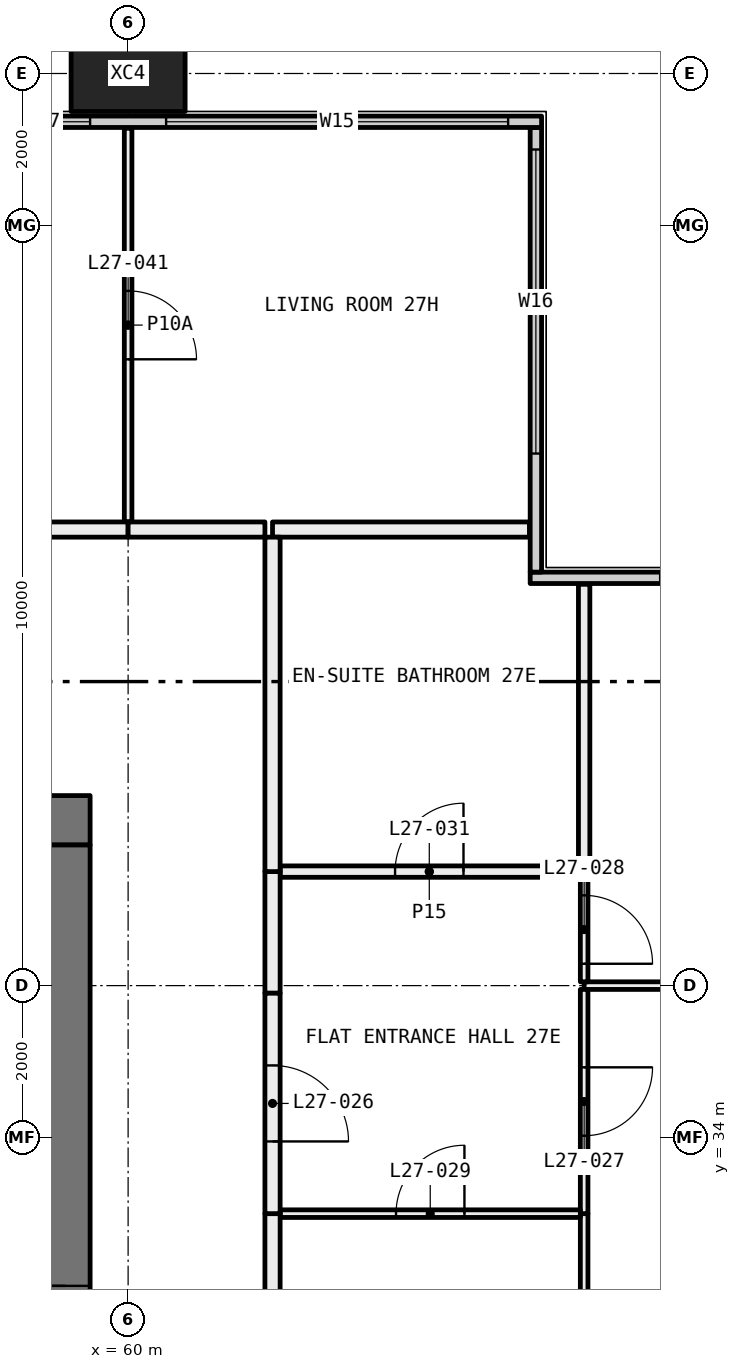
"""IFC4 building model, lengths in metres.
Left out: names, types, materials, properties, quantities, classifications, styles, units other than length and angle.
Written with IfcOpenShell. Run it as: python <this file> out.ifc"""

import sys

from ifc_helpers import new_model, si_unit, direction, frame, frame_2d, origin, origin_2d, place, context, subcontext, project, spatial, rectangle, hollow_rectangle, extrude, element, fill, save


model = new_model("IFC4")
c1 = context("Model", 3, precision=1e-05, world=origin(), true_north=direction((0.0, 1.0)))
c2 = subcontext(c1, "Body", "Model", "MODEL_VIEW")
j1 = project(units=[si_unit("LENGTHUNIT", "METRE"), si_unit("PLANEANGLEUNIT", "RADIAN")], contexts=[c1])
p1 = place(None, origin())
s1 = spatial("IfcSite", under=j1, at=p1, CompositionType="ELEMENT")
p2 = place(p1, origin())
s2 = spatial("IfcBuilding", under=s1, at=p2, CompositionType="ELEMENT")
p3 = place(p2, frame((0.0, 0.0, 106.95)))
s3 = spatial("IfcBuildingStorey", under=s2, at=p3, CompositionType="ELEMENT", Elevation=106.95)
p4 = place(p3, frame((60.0, 48.0, -0.4), z_axis=(0.0, 0.0, 1.0), x_axis=(1.0, 0.0, 0.0)))
e1 = element("IfcColumn", 1, at=p4, inside=s3, PredefinedType="COLUMN", context=c2, shape_type="SweptSolid", body=[
    extrude(hollow_rectangle(XDim=1.5, YDim=1.0, WallThickness=0.06, at=origin_2d()), origin(), (0.0, 0.0, 1.0), 3.45),
])
p5 = place(p3, frame((65.29, 41.365, 0.0), z_axis=(0.0, 0.0, 1.0), x_axis=(1.0, 0.0, 0.0)))
e2 = element("IfcWall", 2, at=p5, inside=s3, PredefinedType="ELEMENTEDWALL", context=c2, shape_type="SweptSolid", body=[
    extrude(rectangle(XDim=6.15, YDim=0.15, at=frame_2d((3.075, 0.0))), origin(), (0.0, 0.0, 1.0), 3.05),
])
p6 = place(p5, frame((1.71, 0.0, 0.45)))
e3 = element("IfcOpeningElement", 3, at=p6, cuts=e2, PredefinedType="OPENING", context=c2, shape_type="SweptSolid", body=[
    extrude(rectangle(XDim=4.0, YDim=2.55, at=frame_2d((2.0, 1.275))), frame((0.0, 0.085, 0.0), z_axis=(0.0, -1.0, 0.0), x_axis=(1.0, 0.0, 0.0)), (0.0, 0.0, 1.0), 0.17),
])
p7 = place(p3, frame((65.365, 41.44, 0.0), z_axis=(0.0, 0.0, 1.0), x_axis=(0.0, 1.0, 0.0)))
e4 = element("IfcWall", 4, at=p7, inside=s3, PredefinedType="ELEMENTEDWALL", context=c2, shape_type="SweptSolid", body=[
    extrude(rectangle(XDim=5.85, YDim=0.15, at=frame_2d((2.925, 0.0))), origin(), (0.0, 0.0, 1.0), 3.05),
])
p8 = place(p7, frame((1.56, 0.0, 0.45)))
e5 = element("IfcOpeningElement", 5, at=p8, cuts=e4, PredefinedType="OPENING", context=c2, shape_type="SweptSolid", body=[
    extrude(rectangle(XDim=4.0, YDim=2.55, at=frame_2d((2.0, 1.275))), frame((0.0, 0.085, 0.0), z_axis=(0.0, -1.0, 0.0), x_axis=(1.0, 0.0, 0.0)), (0.0, 0.0, 1.0), 0.17),
])
p9 = place(p3, frame((6.56, 47.365, 0.0), z_axis=(0.0, 0.0, 1.0), x_axis=(1.0, 0.0, 0.0)))
e6 = element("IfcWall", 6, at=p9, inside=s3, PredefinedType="ELEMENTEDWALL", context=c2, shape_type="SweptSolid", body=[
    extrude(rectangle(XDim=58.88, YDim=0.15, at=frame_2d((29.44, 0.0))), origin(), (0.0, 0.0, 1.0), 3.05),
])
p10 = place(p9, frame((0.44, 0.0, 0.45)))
e7 = element("IfcOpeningElement", 7, at=p10, cuts=e6, PredefinedType="OPENING", context=c2, shape_type="SweptSolid", body=[
    extrude(rectangle(XDim=4.5, YDim=2.55, at=frame_2d((2.25, 1.275))), frame((0.0, 0.085, 0.0), z_axis=(0.0, -1.0, 0.0), x_axis=(1.0, 0.0, 0.0)), (0.0, 0.0, 1.0), 0.17),
])
p11 = place(p9, frame((5.94, 0.0, 0.45)))
e8 = element("IfcOpeningElement", 8, at=p11, cuts=e6, PredefinedType="OPENING", context=c2, shape_type="SweptSolid", body=[
    extrude(rectangle(XDim=1.25, YDim=2.55, at=frame_2d((0.625, 1.275))), frame((0.0, 0.085, 0.0), z_axis=(0.0, -1.0, 0.0), x_axis=(1.0, 0.0, 0.0)), (0.0, 0.0, 1.0), 0.17),
])
p12 = place(p9, frame((15.69, 0.0, 0.45)))
e9 = element("IfcOpeningElement", 9, at=p12, cuts=e6, PredefinedType="OPENING", context=c2, shape_type="SweptSolid", body=[
    extrude(rectangle(XDim=1.25, YDim=2.55, at=frame_2d((0.625, 1.275))), frame((0.0, 0.085, 0.0), z_axis=(0.0, -1.0, 0.0), x_axis=(1.0, 0.0, 0.0)), (0.0, 0.0, 1.0), 0.17),
])
p13 = place(p9, frame((17.94, 0.0, 0.45)))
e10 = element("IfcOpeningElement", 10, at=p13, cuts=e6, PredefinedType="OPENING", context=c2, shape_type="SweptSolid", body=[
    extrude(rectangle(XDim=1.25, YDim=2.55, at=frame_2d((0.625, 1.275))), frame((0.0, 0.085, 0.0), z_axis=(0.0, -1.0, 0.0), x_axis=(1.0, 0.0, 0.0)), (0.0, 0.0, 1.0), 0.17),
])
p14 = place(p9, frame((27.69, 0.0, 0.45)))
e11 = element("IfcOpeningElement", 11, at=p14, cuts=e6, PredefinedType="OPENING", context=c2, shape_type="SweptSolid", body=[
    extrude(rectangle(XDim=1.25, YDim=2.55, at=frame_2d((0.625, 1.275))), frame((0.0, 0.085, 0.0), z_axis=(0.0, -1.0, 0.0), x_axis=(1.0, 0.0, 0.0)), (0.0, 0.0, 1.0), 0.17),
])
p15 = place(p9, frame((29.94, 0.0, 0.45)))
e12 = element("IfcOpeningElement", 12, at=p15, cuts=e6, PredefinedType="OPENING", context=c2, shape_type="SweptSolid", body=[
    extrude(rectangle(XDim=1.25, YDim=2.55, at=frame_2d((0.625, 1.275))), frame((0.0, 0.085, 0.0), z_axis=(0.0, -1.0, 0.0), x_axis=(1.0, 0.0, 0.0)), (0.0, 0.0, 1.0), 0.17),
])
p16 = place(p9, frame((39.69, 0.0, 0.45)))
e13 = element("IfcOpeningElement", 13, at=p16, cuts=e6, PredefinedType="OPENING", context=c2, shape_type="SweptSolid", body=[
    extrude(rectangle(XDim=1.25, YDim=2.55, at=frame_2d((0.625, 1.275))), frame((0.0, 0.085, 0.0), z_axis=(0.0, -1.0, 0.0), x_axis=(1.0, 0.0, 0.0)), (0.0, 0.0, 1.0), 0.17),
])
p17 = place(p9, frame((41.94, 0.0, 0.45)))
e14 = element("IfcOpeningElement", 14, at=p17, cuts=e6, PredefinedType="OPENING", context=c2, shape_type="SweptSolid", body=[
    extrude(rectangle(XDim=1.25, YDim=2.55, at=frame_2d((0.625, 1.275))), frame((0.0, 0.085, 0.0), z_axis=(0.0, -1.0, 0.0), x_axis=(1.0, 0.0, 0.0)), (0.0, 0.0, 1.0), 0.17),
])
p18 = place(p9, frame((51.69, 0.0, 0.45)))
e15 = element("IfcOpeningElement", 15, at=p18, cuts=e6, PredefinedType="OPENING", context=c2, shape_type="SweptSolid", body=[
    extrude(rectangle(XDim=1.25, YDim=2.55, at=frame_2d((0.625, 1.275))), frame((0.0, 0.085, 0.0), z_axis=(0.0, -1.0, 0.0), x_axis=(1.0, 0.0, 0.0)), (0.0, 0.0, 1.0), 0.17),
])
p19 = place(p9, frame((53.94, 0.0, 0.45)))
e16 = element("IfcOpeningElement", 16, at=p19, cuts=e6, PredefinedType="OPENING", context=c2, shape_type="SweptSolid", body=[
    extrude(rectangle(XDim=4.5, YDim=2.55, at=frame_2d((2.25, 1.275))), frame((0.0, 0.085, 0.0), z_axis=(0.0, -1.0, 0.0), x_axis=(1.0, 0.0, 0.0)), (0.0, 0.0, 1.0), 0.17),
])
p20 = place(p3, frame((71.28, 36.0, 0.0), z_axis=(0.0, 0.0, 1.0), x_axis=(-1.0, 0.0, 0.0)))
e17 = element("IfcWall", 17, at=p20, inside=s3, PredefinedType="PARTITIONING", context=c2, shape_type="SweptSolid", body=[
    extrude(rectangle(XDim=5.28, YDim=0.1, at=frame_2d((2.64, 0.0))), origin(), (0.0, 0.0, 1.0), 2.45),
])
p21 = place(p3, frame((66.0, 33.0, 0.0), z_axis=(0.0, 0.0, 1.0), x_axis=(0.0, -1.0, 0.0)))
e18 = element("IfcWall", 18, at=p21, inside=s3, PredefinedType="PARTITIONING", context=c2, shape_type="SweptSolid", body=[
    extrude(rectangle(XDim=2.95, YDim=0.1, at=frame_2d((1.475, 0.0))), origin(), (0.0, 0.0, 1.0), 3.05),
])
p22 = place(p3, frame((66.0, 35.95, 0.0), z_axis=(0.0, 0.0, 1.0), x_axis=(0.0, -1.0, 0.0)))
e19 = element("IfcWall", 19, at=p22, inside=s3, PredefinedType="PARTITIONING", context=c2, shape_type="SweptSolid", body=[
    extrude(rectangle(XDim=2.95, YDim=0.1, at=frame_2d((1.475, 0.0))), origin(), (0.0, 0.0, 1.0), 2.45),
])
p23 = place(p22, frame((1.025, 0.0, 0.0)))
e20 = element("IfcOpeningElement", 20, at=p23, cuts=e19, PredefinedType="OPENING", context=c2, shape_type="SweptSolid", body=[
    extrude(rectangle(XDim=0.9, YDim=2.1, at=frame_2d((0.45, 1.05))), frame((0.0, 0.06, 0.0), z_axis=(0.0, -1.0, 0.0), x_axis=(1.0, 0.0, 0.0)), (0.0, 0.0, 1.0), 0.12),
])
p24 = place(p3, frame((66.0, 37.425, 0.0), z_axis=(0.0, 0.0, 1.0), x_axis=(0.0, -1.0, 0.0)))
e21 = element("IfcWall", 21, at=p24, inside=s3, PredefinedType="PARTITIONING", context=c2, shape_type="SweptSolid", body=[
    extrude(rectangle(XDim=1.375, YDim=0.1, at=frame_2d((0.688, 0.0))), origin(), (0.0, 0.0, 1.0), 2.45),
])
p25 = place(p24, frame((0.238, 0.0, 0.0)))
e22 = element("IfcOpeningElement", 22, at=p25, cuts=e21, PredefinedType="OPENING", context=c2, shape_type="SweptSolid", body=[
    extrude(rectangle(XDim=0.9, YDim=2.1, at=frame_2d((0.45, 1.05))), frame((0.0, 0.06, 0.0), z_axis=(0.0, -1.0, 0.0), x_axis=(1.0, 0.0, 0.0)), (0.0, 0.0, 1.0), 0.12),
])
p26 = place(p3, frame((66.0, 41.28, 0.0), z_axis=(0.0, 0.0, 1.0), x_axis=(0.0, -1.0, 0.0)))
e23 = element("IfcWall", 23, at=p26, inside=s3, PredefinedType="PARTITIONING", context=c2, shape_type="SweptSolid", body=[
    extrude(rectangle(XDim=3.78, YDim=0.15, at=frame_2d((1.89, 0.0))), origin(), (0.0, 0.0, 1.0), 3.05),
])
p27 = place(p3, frame((65.95, 33.0, 0.0), z_axis=(0.0, 0.0, 1.0), x_axis=(-1.0, 0.0, 0.0)))
e24 = element("IfcWall", 24, at=p27, inside=s3, PredefinedType="PARTITIONING", context=c2, shape_type="SweptSolid", body=[
    extrude(rectangle(XDim=3.95, YDim=0.1, at=frame_2d((1.975, 0.0))), origin(), (0.0, 0.0, 1.0), 3.05),
])
p28 = place(p27, frame((1.525, 0.0, 0.0)))
e25 = element("IfcOpeningElement", 25, at=p28, cuts=e24, PredefinedType="OPENING", context=c2, shape_type="SweptSolid", body=[
    extrude(rectangle(XDim=0.9, YDim=2.1, at=frame_2d((0.45, 1.05))), frame((0.0, 0.06, 0.0), z_axis=(0.0, -1.0, 0.0), x_axis=(1.0, 0.0, 0.0)), (0.0, 0.0, 1.0), 0.12),
])
p29 = place(p3, frame((61.9, 33.0, 0.0), z_axis=(0.0, 0.0, 1.0), x_axis=(0.0, -1.0, 0.0)))
e26 = element("IfcWall", 26, at=p29, inside=s3, PredefinedType="PARTITIONING", context=c2, shape_type="SweptSolid", body=[
    extrude(rectangle(XDim=9.1, YDim=0.2, at=frame_2d((4.55, 0.0))), origin(), (0.0, 0.0, 1.0), 2.45),
])
p30 = place(p3, frame((65.925, 37.5, 0.0), z_axis=(0.0, 0.0, 1.0), x_axis=(-1.0, 0.0, 0.0)))
e27 = element("IfcWall", 27, at=p30, inside=s3, PredefinedType="PARTITIONING", context=c2, shape_type="SweptSolid", body=[
    extrude(rectangle(XDim=3.925, YDim=0.15, at=frame_2d((1.962, 0.0))), origin(), (0.0, 0.0, 1.0), 3.05),
])
p31 = place(p30, frame((1.512, 0.0, 0.0)))
e28 = element("IfcOpeningElement", 28, at=p31, cuts=e27, PredefinedType="OPENING", context=c2, shape_type="SweptSolid", body=[
    extrude(rectangle(XDim=0.9, YDim=2.1, at=frame_2d((0.45, 1.05))), frame((0.0, 0.085, 0.0), z_axis=(0.0, -1.0, 0.0), x_axis=(1.0, 0.0, 0.0)), (0.0, 0.0, 1.0), 0.17),
])
p32 = place(p3, frame((61.9, 37.5, 0.0), z_axis=(0.0, 0.0, 1.0), x_axis=(0.0, -1.0, 0.0)))
e29 = element("IfcWall", 29, at=p32, inside=s3, PredefinedType="PARTITIONING", context=c2, shape_type="SweptSolid", body=[
    extrude(rectangle(XDim=1.6, YDim=0.2, at=frame_2d((0.8, 0.0))), origin(), (0.0, 0.0, 1.0), 2.45),
])
p33 = place(p3, frame((61.9, 35.9, 0.0), z_axis=(0.0, 0.0, 1.0), x_axis=(0.0, -1.0, 0.0)))
e30 = element("IfcWall", 30, at=p33, inside=s3, PredefinedType="PARTITIONING", context=c2, shape_type="SweptSolid", body=[
    extrude(rectangle(XDim=2.9, YDim=0.2, at=frame_2d((1.45, 0.0))), origin(), (0.0, 0.0, 1.0), 3.05),
])
p34 = place(p33, frame((0.95, 0.0, 0.0)))
e31 = element("IfcOpeningElement", 31, at=p34, cuts=e30, PredefinedType="OPENING", context=c2, shape_type="SweptSolid", body=[
    extrude(rectangle(XDim=1.0, YDim=2.1, at=frame_2d((0.5, 1.05))), frame((0.0, 0.11, 0.0), z_axis=(0.0, -1.0, 0.0), x_axis=(1.0, 0.0, 0.0)), (0.0, 0.0, 1.0), 0.22),
])
p35 = place(p3, frame((65.28, 42.0, 0.0), z_axis=(0.0, 0.0, 1.0), x_axis=(-1.0, 0.0, 0.0)))
e32 = element("IfcWall", 32, at=p35, inside=s3, PredefinedType="PARTITIONING", context=c2, shape_type="SweptSolid", body=[
    extrude(rectangle(XDim=3.38, YDim=0.2, at=frame_2d((1.69, 0.0))), origin(), (0.0, 0.0, 1.0), 3.05),
])
p36 = place(p3, frame((61.9, 41.9, 0.0), z_axis=(0.0, 0.0, 1.0), x_axis=(0.0, -1.0, 0.0)))
e33 = element("IfcWall", 33, at=p36, inside=s3, PredefinedType="PARTITIONING", context=c2, shape_type="SweptSolid", body=[
    extrude(rectangle(XDim=4.4, YDim=0.2, at=frame_2d((2.2, 0.0))), origin(), (0.0, 0.0, 1.0), 3.05),
])
p37 = place(p3, frame((60.0, 42.1, 0.0), z_axis=(0.0, 0.0, 1.0), x_axis=(0.0, 1.0, 0.0)))
e34 = element("IfcWall", 34, at=p37, inside=s3, PredefinedType="PARTITIONING", context=c2, shape_type="SweptSolid", body=[
    extrude(rectangle(XDim=5.18, YDim=0.1, at=frame_2d((2.59, 0.0))), origin(), (0.0, 0.0, 1.0), 3.05),
])
p38 = place(p37, frame((2.14, 0.0, 0.0)))
e35 = element("IfcOpeningElement", 35, at=p38, cuts=e34, PredefinedType="OPENING", context=c2, shape_type="SweptSolid", body=[
    extrude(rectangle(XDim=0.9, YDim=2.1, at=frame_2d((0.45, 1.05))), frame((0.0, 0.06, 0.0), z_axis=(0.0, -1.0, 0.0), x_axis=(1.0, 0.0, 0.0)), (0.0, 0.0, 1.0), 0.12),
])
p39 = place(p3, frame((54.0, 42.0, 0.0), z_axis=(0.0, 0.0, 1.0), x_axis=(1.0, 0.0, 0.0)))
e36 = element("IfcWall", 36, at=p39, inside=s3, PredefinedType="PARTITIONING", context=c2, shape_type="SweptSolid", body=[
    extrude(rectangle(XDim=6.0, YDim=0.2, at=frame_2d((3.0, 0.0))), origin(), (0.0, 0.0, 1.0), 3.05),
])
p40 = place(p39, frame((2.5, 0.0, 0.0)))
e37 = element("IfcOpeningElement", 37, at=p40, cuts=e36, PredefinedType="OPENING", context=c2, shape_type="SweptSolid", body=[
    extrude(rectangle(XDim=1.0, YDim=2.1, at=frame_2d((0.5, 1.05))), frame((0.0, 0.11, 0.0), z_axis=(0.0, -1.0, 0.0), x_axis=(1.0, 0.0, 0.0)), (0.0, 0.0, 1.0), 0.22),
])
p41 = place(p3, frame((60.0, 42.0, 0.0), z_axis=(0.0, 0.0, 1.0), x_axis=(1.0, 0.0, 0.0)))
e38 = element("IfcWall", 38, at=p41, inside=s3, PredefinedType="PARTITIONING", context=c2, shape_type="SweptSolid", body=[
    extrude(rectangle(XDim=1.8, YDim=0.2, at=frame_2d((0.9, 0.0))), origin(), (0.0, 0.0, 1.0), 3.05),
])
p42 = place(p3, frame((59.5, 38.175, 0.0), z_axis=(0.0, 0.0, 1.0), x_axis=(-1.0, 0.0, 0.0)))
e39 = element("IfcWall", 39, at=p42, inside=s3, PredefinedType="SHEAR", context=c2, shape_type="SweptSolid", body=[
    extrude(rectangle(XDim=11.0, YDim=0.65, at=frame_2d((5.5, 0.0))), origin(), (0.0, 0.0, 1.0), 3.05),
])
p43 = place(p42, frame((8.475, 0.0, 0.0)))
e40 = element("IfcOpeningElement", 40, at=p43, cuts=e39, PredefinedType="OPENING", context=c2, shape_type="SweptSolid", body=[
    extrude(rectangle(XDim=1.6, YDim=2.1, at=frame_2d((0.8, 1.05))), frame((0.0, 0.335, 0.0), z_axis=(0.0, -1.0, 0.0), x_axis=(1.0, 0.0, 0.0)), (0.0, 0.0, 1.0), 0.67),
])
p44 = place(p3, frame((59.175, 22.15, 0.0), z_axis=(0.0, 0.0, 1.0), x_axis=(0.0, 1.0, 0.0)))
e41 = element("IfcWall", 41, at=p44, inside=s3, PredefinedType="SHEAR", context=c2, shape_type="SweptSolid", body=[
    extrude(rectangle(XDim=15.7, YDim=0.65, at=frame_2d((7.85, 0.0))), origin(), (0.0, 0.0, 1.0), 3.05),
])
p45 = place(p44, frame((8.3, 0.0, 0.0)))
e42 = element("IfcOpeningElement", 42, at=p45, cuts=e41, PredefinedType="OPENING", context=c2, shape_type="SweptSolid", body=[
    extrude(rectangle(XDim=1.6, YDim=2.1, at=frame_2d((0.8, 1.05))), frame((0.0, 0.335, 0.0), z_axis=(0.0, -1.0, 0.0), x_axis=(1.0, 0.0, 0.0)), (0.0, 0.0, 1.0), 0.67),
])
p46 = place(p44, frame((2.125, 0.0, 0.0)))
e43 = element("IfcOpeningElement", 43, at=p46, cuts=e41, PredefinedType="OPENING", context=c2, shape_type="SweptSolid", body=[
    extrude(rectangle(XDim=1.0, YDim=2.1, at=frame_2d((0.5, 1.05))), frame((0.0, 0.335, 0.0), z_axis=(0.0, -1.0, 0.0), x_axis=(1.0, 0.0, 0.0)), (0.0, 0.0, 1.0), 0.67),
])
p47 = place(p8, origin())
e44 = element("IfcWindow", 44, at=p47, inside=s3, PartitioningType="SINGLE_PANEL", PredefinedType="WINDOW", context=c2, shape_type="SweptSolid", body=[
    extrude(rectangle(XDim=4.0, YDim=2.55, at=frame_2d((2.0, 1.275))), frame((0.0, 0.03, 0.0), z_axis=(0.0, -1.0, 0.0), x_axis=(1.0, 0.0, 0.0)), (0.0, 0.0, 1.0), 0.06),
])
fill(e5, e44)
p48 = place(p18, origin())
e45 = element("IfcWindow", 45, at=p48, inside=s3, PartitioningType="SINGLE_PANEL", PredefinedType="WINDOW", context=c2, shape_type="SweptSolid", body=[
    extrude(rectangle(XDim=1.25, YDim=2.55, at=frame_2d((0.625, 1.275))), frame((0.0, 0.03, 0.0), z_axis=(0.0, -1.0, 0.0), x_axis=(1.0, 0.0, 0.0)), (0.0, 0.0, 1.0), 0.06),
])
fill(e15, e45)
p49 = place(p19, origin())
e46 = element("IfcWindow", 46, at=p49, inside=s3, PartitioningType="SINGLE_PANEL", PredefinedType="WINDOW", context=c2, shape_type="SweptSolid", body=[
    extrude(rectangle(XDim=4.5, YDim=2.55, at=frame_2d((2.25, 1.275))), frame((0.0, 0.03, 0.0), z_axis=(0.0, -1.0, 0.0), x_axis=(1.0, 0.0, 0.0)), (0.0, 0.0, 1.0), 0.06),
])
fill(e16, e46)
p50 = place(p34, origin())
e47 = element("IfcDoor", 47, at=p50, inside=s3, OperationType="SINGLE_SWING_LEFT", PredefinedType="DOOR", context=c2, shape_type="SweptSolid", body=[
    extrude(rectangle(XDim=1.0, YDim=2.1, at=frame_2d((0.5, 1.05))), frame((0.0, 0.025, 0.0), z_axis=(0.0, -1.0, 0.0), x_axis=(1.0, 0.0, 0.0)), (0.0, 0.0, 1.0), 0.05),
])
fill(e31, e47)
p51 = place(p23, origin())
e48 = element("IfcDoor", 48, at=p51, inside=s3, OperationType="SINGLE_SWING_RIGHT", PredefinedType="DOOR", context=c2, shape_type="SweptSolid", body=[
    extrude(rectangle(XDim=0.9, YDim=2.1, at=frame_2d((0.45, 1.05))), frame((0.0, 0.025, 0.0), z_axis=(0.0, -1.0, 0.0), x_axis=(1.0, 0.0, 0.0)), (0.0, 0.0, 1.0), 0.05),
])
fill(e20, e48)
p52 = place(p25, origin())
e49 = element("IfcDoor", 49, at=p52, inside=s3, OperationType="SINGLE_SWING_LEFT", PredefinedType="DOOR", context=c2, shape_type="SweptSolid", body=[
    extrude(rectangle(XDim=0.9, YDim=2.1, at=frame_2d((0.45, 1.05))), frame((0.0, 0.025, 0.0), z_axis=(0.0, -1.0, 0.0), x_axis=(1.0, 0.0, 0.0)), (0.0, 0.0, 1.0), 0.05),
])
fill(e22, e49)
p53 = place(p28, frame((0.9, 0.0, 0.0), x_axis=(-1.0, 0.0, 0.0)))
e50 = element("IfcDoor", 50, at=p53, inside=s3, OperationType="SINGLE_SWING_LEFT", PredefinedType="DOOR", context=c2, shape_type="SweptSolid", body=[
    extrude(rectangle(XDim=0.9, YDim=2.1, at=frame_2d((0.45, 1.05))), frame((0.0, 0.025, 0.0), z_axis=(0.0, -1.0, 0.0), x_axis=(1.0, 0.0, 0.0)), (0.0, 0.0, 1.0), 0.05),
])
fill(e25, e50)
p54 = place(p31, frame((0.9, 0.0, 0.0), x_axis=(-1.0, 0.0, 0.0)))
e51 = element("IfcDoor", 51, at=p54, inside=s3, OperationType="SINGLE_SWING_LEFT", PredefinedType="DOOR", context=c2, shape_type="SweptSolid", body=[
    extrude(rectangle(XDim=0.9, YDim=2.1, at=frame_2d((0.45, 1.05))), frame((0.0, 0.025, 0.0), z_axis=(0.0, -1.0, 0.0), x_axis=(1.0, 0.0, 0.0)), (0.0, 0.0, 1.0), 0.05),
])
fill(e28, e51)
p55 = place(p38, frame((0.9, 0.0, 0.0), x_axis=(-1.0, 0.0, 0.0)))
e52 = element("IfcDoor", 52, at=p55, inside=s3, OperationType="SINGLE_SWING_LEFT", PredefinedType="DOOR", context=c2, shape_type="SweptSolid", body=[
    extrude(rectangle(XDim=0.9, YDim=2.1, at=frame_2d((0.45, 1.05))), frame((0.0, 0.025, 0.0), z_axis=(0.0, -1.0, 0.0), x_axis=(1.0, 0.0, 0.0)), (0.0, 0.0, 1.0), 0.05),
])
fill(e35, e52)
p56 = place(p45, origin())
e53 = element("IfcDoor", 53, at=p56, inside=s3, OperationType="DOUBLE_DOOR_SINGLE_SWING", PredefinedType="DOOR", context=c2, shape_type="SweptSolid", body=[
    extrude(rectangle(XDim=1.6, YDim=2.1, at=frame_2d((0.8, 1.05))), frame((0.0, 0.025, 0.0), z_axis=(0.0, -1.0, 0.0), x_axis=(1.0, 0.0, 0.0)), (0.0, 0.0, 1.0), 0.05),
])
fill(e42, e53)
save(model, sys.argv[1])
